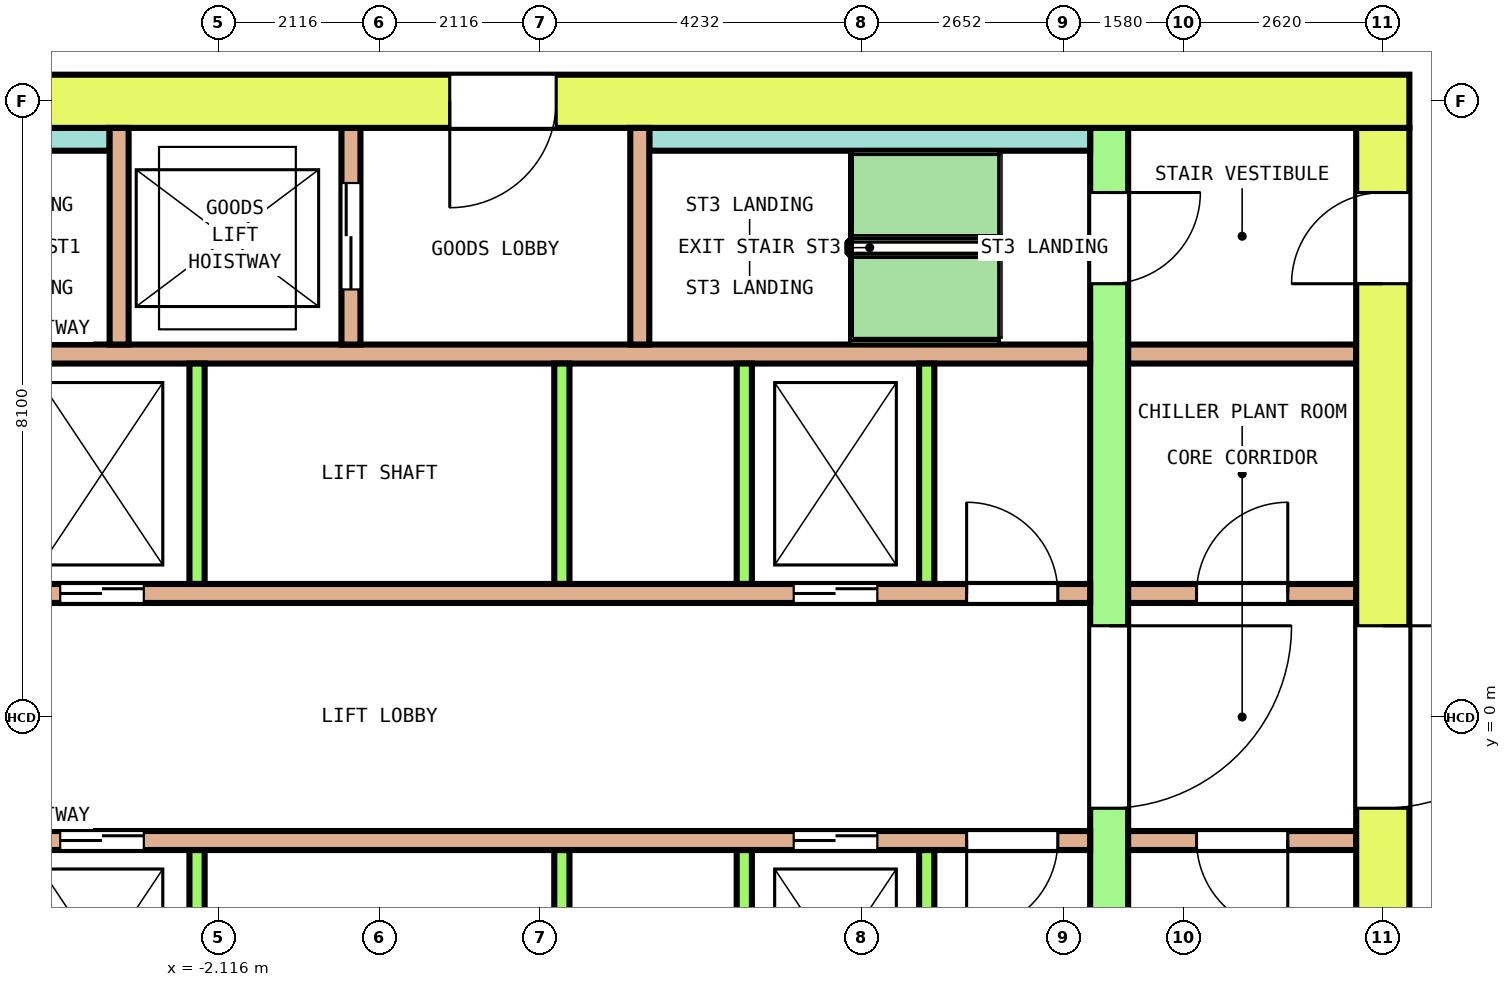
"""IFC4 building model, lengths in metres.
Left out: names, types, materials, properties, quantities, classifications, styles, units other than length and angle.
Written with IfcOpenShell. Run it as: python <this file> out.ifc"""

import sys

from ifc_helpers import new_model, si_unit, direction, frame, frame_2d, origin, place, context, subcontext, project, spatial, rectangle, extrude, element, fill, save


model = new_model("IFC4")
c1 = context("Model", 3, precision=1e-05, world=origin(), true_north=direction((0.0, 1.0)))
c2 = subcontext(c1, "Body", "Model", "MODEL_VIEW")
j1 = project(units=[si_unit("LENGTHUNIT", "METRE"), si_unit("PLANEANGLEUNIT", "RADIAN")], contexts=[c1])
p1 = place(None, origin())
s1 = spatial("IfcSite", under=j1, at=p1, CompositionType="ELEMENT")
p2 = place(p1, origin())
s2 = spatial("IfcBuilding", under=s1, at=p2, CompositionType="ELEMENT")
p3 = place(p2, frame((0.0, 0.0, 139.6)))
s3 = spatial("IfcBuildingStorey", under=s2, at=p3, CompositionType="ELEMENT", Elevation=139.6)
p4 = place(p3, frame((-13.55, 8.1, 0.0), z_axis=(0.0, 0.0, 1.0), x_axis=(1.0, 0.0, 0.0)))
e1 = element("IfcWall", 1, at=p4, inside=s3, PredefinedType="SHEAR", context=c2, shape_type="SweptSolid", body=[
    extrude(rectangle(XDim=27.1, YDim=0.7, at=frame_2d((13.55, 0.0))), origin(), (0.0, 0.0, 1.0), 5.3),
])
p5 = place(p4, frame((14.475, 0.0, 0.0)))
e2 = element("IfcOpeningElement", 2, at=p5, cuts=e1, PredefinedType="OPENING", context=c2, shape_type="SweptSolid", body=[
    extrude(rectangle(XDim=1.4, YDim=2.1, at=frame_2d((0.7, 1.05))), frame((0.0, 0.36, 0.0), z_axis=(0.0, -1.0, 0.0), x_axis=(1.0, 0.0, 0.0)), (0.0, 0.0, 1.0), 0.72),
])
p6 = place(p3, frame((13.2, -7.75, 0.0), z_axis=(0.0, 0.0, 1.0), x_axis=(0.0, 1.0, 0.0)))
e3 = element("IfcWall", 3, at=p6, inside=s3, PredefinedType="SHEAR", context=c2, shape_type="SweptSolid", body=[
    extrude(rectangle(XDim=15.5, YDim=0.7, at=frame_2d((7.75, 0.0))), origin(), (0.0, 0.0, 1.0), 5.3),
])
p7 = place(p6, frame((6.55, 0.0, 0.0)))
e4 = element("IfcOpeningElement", 4, at=p7, cuts=e3, PredefinedType="OPENING", context=c2, shape_type="SweptSolid", body=[
    extrude(rectangle(XDim=2.4, YDim=2.1, at=frame_2d((1.2, 1.05))), frame((0.0, 0.36, 0.0), z_axis=(0.0, -1.0, 0.0), x_axis=(1.0, 0.0, 0.0)), (0.0, 0.0, 1.0), 0.72),
])
p8 = place(p6, frame((13.45, 0.0, 0.0)))
e5 = element("IfcOpeningElement", 5, at=p8, cuts=e3, PredefinedType="OPENING", context=c2, shape_type="SweptSolid", body=[
    extrude(rectangle(XDim=1.2, YDim=2.1, at=frame_2d((0.6, 1.05))), frame((0.0, 0.36, 0.0), z_axis=(0.0, -1.0, 0.0), x_axis=(1.0, 0.0, 0.0)), (0.0, 0.0, 1.0), 0.72),
])
p9 = place(p6, frame((0.95, 0.0, 0.0)))
e6 = element("IfcOpeningElement", 6, at=p9, cuts=e3, PredefinedType="OPENING", context=c2, shape_type="SweptSolid", body=[
    extrude(rectangle(XDim=1.0, YDim=2.1, at=frame_2d((0.5, 1.05))), frame((0.0, 0.36, 0.0), z_axis=(0.0, -1.0, 0.0), x_axis=(1.0, 0.0, 0.0)), (0.0, 0.0, 1.0), 0.72),
])
p10 = place(p3, frame((9.6, -7.75, 0.0), z_axis=(0.0, 0.0, 1.0), x_axis=(0.0, 1.0, 0.0)))
e7 = element("IfcWall", 7, at=p10, inside=s3, PredefinedType="SHEAR", context=c2, shape_type="SweptSolid", body=[
    extrude(rectangle(XDim=15.5, YDim=0.5, at=frame_2d((7.75, 0.0))), origin(), (0.0, 0.0, 1.0), 5.3),
])
p11 = place(p10, frame((6.55, 0.0, 0.0)))
e8 = element("IfcOpeningElement", 8, at=p11, cuts=e7, PredefinedType="OPENING", context=c2, shape_type="SweptSolid", body=[
    extrude(rectangle(XDim=2.4, YDim=2.1, at=frame_2d((1.2, 1.05))), frame((0.0, 0.26, 0.0), z_axis=(0.0, -1.0, 0.0), x_axis=(1.0, 0.0, 0.0)), (0.0, 0.0, 1.0), 0.52),
])
p12 = place(p10, frame((13.45, 0.0, 0.0)))
e9 = element("IfcOpeningElement", 9, at=p12, cuts=e7, PredefinedType="OPENING", context=c2, shape_type="SweptSolid", body=[
    extrude(rectangle(XDim=1.2, YDim=2.1, at=frame_2d((0.6, 1.05))), frame((0.0, 0.26, 0.0), z_axis=(0.0, -1.0, 0.0), x_axis=(1.0, 0.0, 0.0)), (0.0, 0.0, 1.0), 0.52),
])
p13 = place(p10, frame((0.95, 0.0, 0.0)))
e10 = element("IfcOpeningElement", 10, at=p13, cuts=e7, PredefinedType="OPENING", context=c2, shape_type="SweptSolid", body=[
    extrude(rectangle(XDim=1.0, YDim=2.1, at=frame_2d((0.5, 1.05))), frame((0.0, 0.26, 0.0), z_axis=(0.0, -1.0, 0.0), x_axis=(1.0, 0.0, 0.0)), (0.0, 0.0, 1.0), 0.52),
])
p14 = place(p3, frame((-9.35, 1.625, 0.0), z_axis=(0.0, 0.0, 1.0), x_axis=(1.0, 0.0, 0.0)))
e11 = element("IfcWall", 11, at=p14, inside=s3, PredefinedType="SOLIDWALL", context=c2, shape_type="SweptSolid", body=[
    extrude(rectangle(XDim=18.7, YDim=0.25, at=frame_2d((9.35, 0.0))), origin(), (0.0, 0.0, 1.0), 5.3),
])
p15 = place(p14, frame((2.85, 0.0, 0.0)))
e12 = element("IfcOpeningElement", 12, at=p15, cuts=e11, PredefinedType="OPENING", context=c2, shape_type="SweptSolid", body=[
    extrude(rectangle(XDim=1.1, YDim=2.1, at=frame_2d((0.55, 1.05))), frame((0.0, 0.135, 0.0), z_axis=(0.0, -1.0, 0.0), x_axis=(1.0, 0.0, 0.0)), (0.0, 0.0, 1.0), 0.27),
])
p16 = place(p14, frame((5.15, 0.0, 0.0)))
e13 = element("IfcOpeningElement", 13, at=p16, cuts=e11, PredefinedType="OPENING", context=c2, shape_type="SweptSolid", body=[
    extrude(rectangle(XDim=1.1, YDim=2.1, at=frame_2d((0.55, 1.05))), frame((0.0, 0.135, 0.0), z_axis=(0.0, -1.0, 0.0), x_axis=(1.0, 0.0, 0.0)), (0.0, 0.0, 1.0), 0.27),
])
p17 = place(p14, frame((14.8, 0.0, 0.0)))
e14 = element("IfcOpeningElement", 14, at=p17, cuts=e11, PredefinedType="OPENING", context=c2, shape_type="SweptSolid", body=[
    extrude(rectangle(XDim=1.1, YDim=2.1, at=frame_2d((0.55, 1.05))), frame((0.0, 0.135, 0.0), z_axis=(0.0, -1.0, 0.0), x_axis=(1.0, 0.0, 0.0)), (0.0, 0.0, 1.0), 0.27),
])
p18 = place(p14, frame((0.425, 0.0, 0.0)))
e15 = element("IfcOpeningElement", 15, at=p18, cuts=e11, PredefinedType="OPENING", context=c2, shape_type="SweptSolid", body=[
    extrude(rectangle(XDim=1.2, YDim=2.1, at=frame_2d((0.6, 1.05))), frame((0.0, 0.135, 0.0), z_axis=(0.0, -1.0, 0.0), x_axis=(1.0, 0.0, 0.0)), (0.0, 0.0, 1.0), 0.27),
])
p19 = place(p14, frame((17.075, 0.0, 0.0)))
e16 = element("IfcOpeningElement", 16, at=p19, cuts=e11, PredefinedType="OPENING", context=c2, shape_type="SweptSolid", body=[
    extrude(rectangle(XDim=1.2, YDim=2.1, at=frame_2d((0.6, 1.05))), frame((0.0, 0.135, 0.0), z_axis=(0.0, -1.0, 0.0), x_axis=(1.0, 0.0, 0.0)), (0.0, 0.0, 1.0), 0.27),
])
p20 = place(p3, frame((9.85, 1.625, 0.0), z_axis=(0.0, 0.0, 1.0), x_axis=(1.0, 0.0, 0.0)))
e17 = element("IfcWall", 17, at=p20, inside=s3, PredefinedType="SOLIDWALL", context=c2, shape_type="SweptSolid", body=[
    extrude(rectangle(XDim=3.0, YDim=0.25, at=frame_2d((1.5, 0.0))), origin(), (0.0, 0.0, 1.0), 5.3),
])
p21 = place(p20, frame((0.9, 0.0, 0.0)))
e18 = element("IfcOpeningElement", 18, at=p21, cuts=e17, PredefinedType="OPENING", context=c2, shape_type="SweptSolid", body=[
    extrude(rectangle(XDim=1.2, YDim=2.1, at=frame_2d((0.6, 1.05))), frame((0.0, 0.135, 0.0), z_axis=(0.0, -1.0, 0.0), x_axis=(1.0, 0.0, 0.0)), (0.0, 0.0, 1.0), 0.27),
])
p22 = place(p3, frame((-9.35, 4.775, 0.0), z_axis=(0.0, 0.0, 1.0), x_axis=(1.0, 0.0, 0.0)))
e19 = element("IfcWall", 19, at=p22, inside=s3, PredefinedType="SOLIDWALL", context=c2, shape_type="SweptSolid", body=[
    extrude(rectangle(XDim=18.7, YDim=0.25, at=frame_2d((9.35, 0.0))), origin(), (0.0, 0.0, 1.0), 5.3),
])
p23 = place(p3, frame((9.85, 4.775, 0.0), z_axis=(0.0, 0.0, 1.0), x_axis=(1.0, 0.0, 0.0)))
e20 = element("IfcWall", 20, at=p23, inside=s3, PredefinedType="SOLIDWALL", context=c2, shape_type="SweptSolid", body=[
    extrude(rectangle(XDim=3.0, YDim=0.25, at=frame_2d((1.5, 0.0))), origin(), (0.0, 0.0, 1.0), 5.3),
])
for number, where, z_axis, x_axis in (
    (21, (-2.4, 1.75, 0.0), (0.0, 0.0, 1.0), (0.0, 1.0, 0.0)),
    (22, (2.4, 1.75, 0.0), (0.0, 0.0, 1.0), (0.0, 1.0, 0.0)),
    (23, (4.8, 1.75, 0.0), (0.0, 0.0, 1.0), (0.0, 1.0, 0.0)),
    (24, (7.2, 1.75, 0.0), (0.0, 0.0, 1.0), (0.0, 1.0, 0.0)),
):
    element("IfcWall", number, at=place(p3, frame(where, z_axis=z_axis, x_axis=x_axis)), inside=s3, PredefinedType="SOLIDWALL", context=c2, shape_type="SweptSolid", body=[
        extrude(rectangle(XDim=2.9, YDim=0.2, at=frame_2d((1.45, 0.0))), origin(), (0.0, 0.0, 1.0), 5.3),
    ])
p24 = place(p3, frame((-9.35, -1.625, 0.0), z_axis=(0.0, 0.0, 1.0), x_axis=(1.0, 0.0, 0.0)))
e25 = element("IfcWall", 25, at=p24, inside=s3, PredefinedType="SOLIDWALL", context=c2, shape_type="SweptSolid", body=[
    extrude(rectangle(XDim=18.7, YDim=0.25, at=frame_2d((9.35, 0.0))), origin(), (0.0, 0.0, 1.0), 5.3),
])
p25 = place(p24, frame((2.85, 0.0, 0.0)))
e26 = element("IfcOpeningElement", 26, at=p25, cuts=e25, PredefinedType="OPENING", context=c2, shape_type="SweptSolid", body=[
    extrude(rectangle(XDim=1.1, YDim=2.1, at=frame_2d((0.55, 1.05))), frame((0.0, 0.135, 0.0), z_axis=(0.0, -1.0, 0.0), x_axis=(1.0, 0.0, 0.0)), (0.0, 0.0, 1.0), 0.27),
])
p26 = place(p24, frame((5.15, 0.0, 0.0)))
e27 = element("IfcOpeningElement", 27, at=p26, cuts=e25, PredefinedType="OPENING", context=c2, shape_type="SweptSolid", body=[
    extrude(rectangle(XDim=1.1, YDim=2.1, at=frame_2d((0.55, 1.05))), frame((0.0, 0.135, 0.0), z_axis=(0.0, -1.0, 0.0), x_axis=(1.0, 0.0, 0.0)), (0.0, 0.0, 1.0), 0.27),
])
p27 = place(p24, frame((14.8, 0.0, 0.0)))
e28 = element("IfcOpeningElement", 28, at=p27, cuts=e25, PredefinedType="OPENING", context=c2, shape_type="SweptSolid", body=[
    extrude(rectangle(XDim=1.1, YDim=2.1, at=frame_2d((0.55, 1.05))), frame((0.0, 0.135, 0.0), z_axis=(0.0, -1.0, 0.0), x_axis=(1.0, 0.0, 0.0)), (0.0, 0.0, 1.0), 0.27),
])
p28 = place(p24, frame((0.425, 0.0, 0.0)))
e29 = element("IfcOpeningElement", 29, at=p28, cuts=e25, PredefinedType="OPENING", context=c2, shape_type="SweptSolid", body=[
    extrude(rectangle(XDim=1.2, YDim=2.1, at=frame_2d((0.6, 1.05))), frame((0.0, 0.135, 0.0), z_axis=(0.0, -1.0, 0.0), x_axis=(1.0, 0.0, 0.0)), (0.0, 0.0, 1.0), 0.27),
])
p29 = place(p24, frame((17.075, 0.0, 0.0)))
e30 = element("IfcOpeningElement", 30, at=p29, cuts=e25, PredefinedType="OPENING", context=c2, shape_type="SweptSolid", body=[
    extrude(rectangle(XDim=1.2, YDim=2.1, at=frame_2d((0.6, 1.05))), frame((0.0, 0.135, 0.0), z_axis=(0.0, -1.0, 0.0), x_axis=(1.0, 0.0, 0.0)), (0.0, 0.0, 1.0), 0.27),
])
p30 = place(p3, frame((9.85, -1.625, 0.0), z_axis=(0.0, 0.0, 1.0), x_axis=(1.0, 0.0, 0.0)))
e31 = element("IfcWall", 31, at=p30, inside=s3, PredefinedType="SOLIDWALL", context=c2, shape_type="SweptSolid", body=[
    extrude(rectangle(XDim=3.0, YDim=0.25, at=frame_2d((1.5, 0.0))), origin(), (0.0, 0.0, 1.0), 5.3),
])
p31 = place(p30, frame((0.9, 0.0, 0.0)))
e32 = element("IfcOpeningElement", 32, at=p31, cuts=e31, PredefinedType="OPENING", context=c2, shape_type="SweptSolid", body=[
    extrude(rectangle(XDim=1.2, YDim=2.1, at=frame_2d((0.6, 1.05))), frame((0.0, 0.135, 0.0), z_axis=(0.0, -1.0, 0.0), x_axis=(1.0, 0.0, 0.0)), (0.0, 0.0, 1.0), 0.27),
])
for number, where, z_axis, x_axis in (
    (33, (-2.4, -4.65, 0.0), (0.0, 0.0, 1.0), (0.0, 1.0, 0.0)),
    (34, (2.4, -4.65, 0.0), (0.0, 0.0, 1.0), (0.0, 1.0, 0.0)),
    (35, (4.8, -4.65, 0.0), (0.0, 0.0, 1.0), (0.0, 1.0, 0.0)),
    (36, (7.2, -4.65, 0.0), (0.0, 0.0, 1.0), (0.0, 1.0, 0.0)),
):
    element("IfcWall", number, at=place(p3, frame(where, z_axis=z_axis, x_axis=x_axis)), inside=s3, PredefinedType="SOLIDWALL", context=c2, shape_type="SweptSolid", body=[
        extrude(rectangle(XDim=2.9, YDim=0.2, at=frame_2d((1.45, 0.0))), origin(), (0.0, 0.0, 1.0), 5.3),
    ])
for number, where, z_axis, x_axis in (
    (37, (-9.35, 7.6, 0.0), (0.0, 0.0, 1.0), (1.0, 0.0, 0.0)),
    (38, (3.55, 7.6, 0.0), (0.0, 0.0, 1.0), (1.0, 0.0, 0.0)),
):
    element("IfcWall", number, at=place(p3, frame(where, z_axis=z_axis, x_axis=x_axis)), inside=s3, PredefinedType="SOLIDWALL", context=c2, shape_type="SweptSolid", body=[
        extrude(rectangle(XDim=5.8, YDim=0.3, at=frame_2d((2.9, 0.0))), origin(), (0.0, 0.0, 1.0), 5.3),
    ])
p32 = place(p3, frame((-3.425, 4.9, 0.0), z_axis=(0.0, 0.0, 1.0), x_axis=(0.0, 1.0, 0.0)))
e39 = element("IfcWall", 39, at=p32, inside=s3, PredefinedType="SOLIDWALL", context=c2, shape_type="SweptSolid", body=[
    extrude(rectangle(XDim=2.85, YDim=0.25, at=frame_2d((1.425, 0.0))), origin(), (0.0, 0.0, 1.0), 5.3),
])
p33 = place(p3, frame((-0.375, 4.9, 0.0), z_axis=(0.0, 0.0, 1.0), x_axis=(0.0, 1.0, 0.0)))
e40 = element("IfcWall", 40, at=p33, inside=s3, PredefinedType="SOLIDWALL", context=c2, shape_type="SweptSolid", body=[
    extrude(rectangle(XDim=2.85, YDim=0.25, at=frame_2d((1.425, 0.0))), origin(), (0.0, 0.0, 1.0), 5.3),
])
p34 = place(p33, frame((0.725, 0.0, 0.0)))
e41 = element("IfcOpeningElement", 41, at=p34, cuts=e40, PredefinedType="OPENING", context=c2, shape_type="SweptSolid", body=[
    extrude(rectangle(XDim=1.4, YDim=2.1, at=frame_2d((0.7, 1.05))), frame((0.0, 0.135, 0.0), z_axis=(0.0, -1.0, 0.0), x_axis=(1.0, 0.0, 0.0)), (0.0, 0.0, 1.0), 0.27),
])
p35 = place(p3, frame((3.425, 4.9, 0.0), z_axis=(0.0, 0.0, 1.0), x_axis=(0.0, 1.0, 0.0)))
e42 = element("IfcWall", 42, at=p35, inside=s3, PredefinedType="SOLIDWALL", context=c2, shape_type="SweptSolid", body=[
    extrude(rectangle(XDim=2.85, YDim=0.25, at=frame_2d((1.425, 0.0))), origin(), (0.0, 0.0, 1.0), 5.3),
])
p36 = place(p16, origin())
e43 = element("IfcDoor", 43, at=p36, inside=s3, OperationType="DOUBLE_DOOR_SLIDING", PredefinedType="DOOR", context=c2, shape_type="SweptSolid", body=[
    extrude(rectangle(XDim=1.1, YDim=2.1, at=frame_2d((0.55, 1.05))), frame((0.0, 0.075, 0.0), z_axis=(0.0, -1.0, 0.0), x_axis=(1.0, 0.0, 0.0)), (0.0, 0.0, 1.0), 0.15),
])
fill(e13, e43)
p37 = place(p17, origin())
e44 = element("IfcDoor", 44, at=p37, inside=s3, OperationType="DOUBLE_DOOR_SLIDING", PredefinedType="DOOR", context=c2, shape_type="SweptSolid", body=[
    extrude(rectangle(XDim=1.1, YDim=2.1, at=frame_2d((0.55, 1.05))), frame((0.0, 0.075, 0.0), z_axis=(0.0, -1.0, 0.0), x_axis=(1.0, 0.0, 0.0)), (0.0, 0.0, 1.0), 0.15),
])
fill(e14, e44)
p38 = place(p26, origin())
e45 = element("IfcDoor", 45, at=p38, inside=s3, OperationType="DOUBLE_DOOR_SLIDING", PredefinedType="DOOR", context=c2, shape_type="SweptSolid", body=[
    extrude(rectangle(XDim=1.1, YDim=2.1, at=frame_2d((0.55, 1.05))), frame((0.0, 0.075, 0.0), z_axis=(0.0, -1.0, 0.0), x_axis=(1.0, 0.0, 0.0)), (0.0, 0.0, 1.0), 0.15),
])
fill(e27, e45)
p39 = place(p27, origin())
e46 = element("IfcDoor", 46, at=p39, inside=s3, OperationType="DOUBLE_DOOR_SLIDING", PredefinedType="DOOR", context=c2, shape_type="SweptSolid", body=[
    extrude(rectangle(XDim=1.1, YDim=2.1, at=frame_2d((0.55, 1.05))), frame((0.0, 0.075, 0.0), z_axis=(0.0, -1.0, 0.0), x_axis=(1.0, 0.0, 0.0)), (0.0, 0.0, 1.0), 0.15),
])
fill(e28, e46)
p40 = place(p34, origin())
e47 = element("IfcDoor", 47, at=p40, inside=s3, OperationType="DOUBLE_DOOR_SLIDING", PredefinedType="DOOR", context=c2, shape_type="SweptSolid", body=[
    extrude(rectangle(XDim=1.4, YDim=2.1, at=frame_2d((0.7, 1.05))), frame((0.0, 0.075, 0.0), z_axis=(0.0, -1.0, 0.0), x_axis=(1.0, 0.0, 0.0)), (0.0, 0.0, 1.0), 0.15),
])
fill(e41, e47)
p41 = place(p11, origin())
e48 = element("IfcDoor", 48, at=p41, inside=s3, OperationType="DOUBLE_DOOR_SINGLE_SWING", PredefinedType="DOOR", context=c2, shape_type="SweptSolid", body=[
    extrude(rectangle(XDim=2.4, YDim=2.1, at=frame_2d((1.2, 1.05))), frame((0.0, 0.2, 0.0), z_axis=(0.0, -1.0, 0.0), x_axis=(1.0, 0.0, 0.0)), (0.0, 0.0, 1.0), 0.4),
])
fill(e8, e48)
p42 = place(p7, origin())
e49 = element("IfcDoor", 49, at=p42, inside=s3, OperationType="DOUBLE_DOOR_SINGLE_SWING", PredefinedType="DOOR", context=c2, shape_type="SweptSolid", body=[
    extrude(rectangle(XDim=2.4, YDim=2.1, at=frame_2d((1.2, 1.05))), frame((0.0, 0.3, 0.0), z_axis=(0.0, -1.0, 0.0), x_axis=(1.0, 0.0, 0.0)), (0.0, 0.0, 1.0), 0.6),
])
fill(e4, e49)
p43 = place(p12, origin())
e50 = element("IfcDoor", 50, at=p43, inside=s3, OperationType="SINGLE_SWING_RIGHT", PredefinedType="DOOR", context=c2, shape_type="SweptSolid", body=[
    extrude(rectangle(XDim=1.2, YDim=2.1, at=frame_2d((0.6, 1.05))), frame((0.0, 0.2, 0.0), z_axis=(0.0, -1.0, 0.0), x_axis=(1.0, 0.0, 0.0)), (0.0, 0.0, 1.0), 0.4),
])
fill(e9, e50)
p44 = place(p8, origin())
e51 = element("IfcDoor", 51, at=p44, inside=s3, OperationType="SINGLE_SWING_LEFT", PredefinedType="DOOR", context=c2, shape_type="SweptSolid", body=[
    extrude(rectangle(XDim=1.2, YDim=2.1, at=frame_2d((0.6, 1.05))), frame((0.0, 0.3, 0.0), z_axis=(0.0, -1.0, 0.0), x_axis=(1.0, 0.0, 0.0)), (0.0, 0.0, 1.0), 0.6),
])
fill(e5, e51)
p45 = place(p5, origin())
e52 = element("IfcDoor", 52, at=p45, inside=s3, OperationType="DOUBLE_DOOR_SINGLE_SWING", PredefinedType="DOOR", context=c2, shape_type="SweptSolid", body=[
    extrude(rectangle(XDim=1.4, YDim=2.1, at=frame_2d((0.7, 1.05))), frame((0.0, 0.3, 0.0), z_axis=(0.0, -1.0, 0.0), x_axis=(1.0, 0.0, 0.0)), (0.0, 0.0, 1.0), 0.6),
])
fill(e2, e52)
p46 = place(p19, origin())
e53 = element("IfcDoor", 53, at=p46, inside=s3, OperationType="SINGLE_SWING_RIGHT", PredefinedType="DOOR", context=c2, shape_type="SweptSolid", body=[
    extrude(rectangle(XDim=1.2, YDim=2.1, at=frame_2d((0.6, 1.05))), frame((0.0, 0.075, 0.0), z_axis=(0.0, -1.0, 0.0), x_axis=(1.0, 0.0, 0.0)), (0.0, 0.0, 1.0), 0.15),
])
fill(e16, e53)
p47 = place(p21, origin())
e54 = element("IfcDoor", 54, at=p47, inside=s3, OperationType="SINGLE_SWING_LEFT", PredefinedType="DOOR", context=c2, shape_type="SweptSolid", body=[
    extrude(rectangle(XDim=1.2, YDim=2.1, at=frame_2d((0.6, 1.05))), frame((0.0, 0.075, 0.0), z_axis=(0.0, -1.0, 0.0), x_axis=(1.0, 0.0, 0.0)), (0.0, 0.0, 1.0), 0.15),
])
fill(e18, e54)
p48 = place(p29, origin())
e55 = element("IfcDoor", 55, at=p48, inside=s3, OperationType="SINGLE_SWING_RIGHT", PredefinedType="DOOR", context=c2, shape_type="SweptSolid", body=[
    extrude(rectangle(XDim=1.2, YDim=2.1, at=frame_2d((0.6, 1.05))), frame((0.0, 0.075, 0.0), z_axis=(0.0, -1.0, 0.0), x_axis=(1.0, 0.0, 0.0)), (0.0, 0.0, 1.0), 0.15),
])
fill(e30, e55)
p49 = place(p31, origin())
e56 = element("IfcDoor", 56, at=p49, inside=s3, OperationType="SINGLE_SWING_LEFT", PredefinedType="DOOR", context=c2, shape_type="SweptSolid", body=[
    extrude(rectangle(XDim=1.2, YDim=2.1, at=frame_2d((0.6, 1.05))), frame((0.0, 0.075, 0.0), z_axis=(0.0, -1.0, 0.0), x_axis=(1.0, 0.0, 0.0)), (0.0, 0.0, 1.0), 0.15),
])
fill(e32, e56)
save(model, sys.argv[1])
